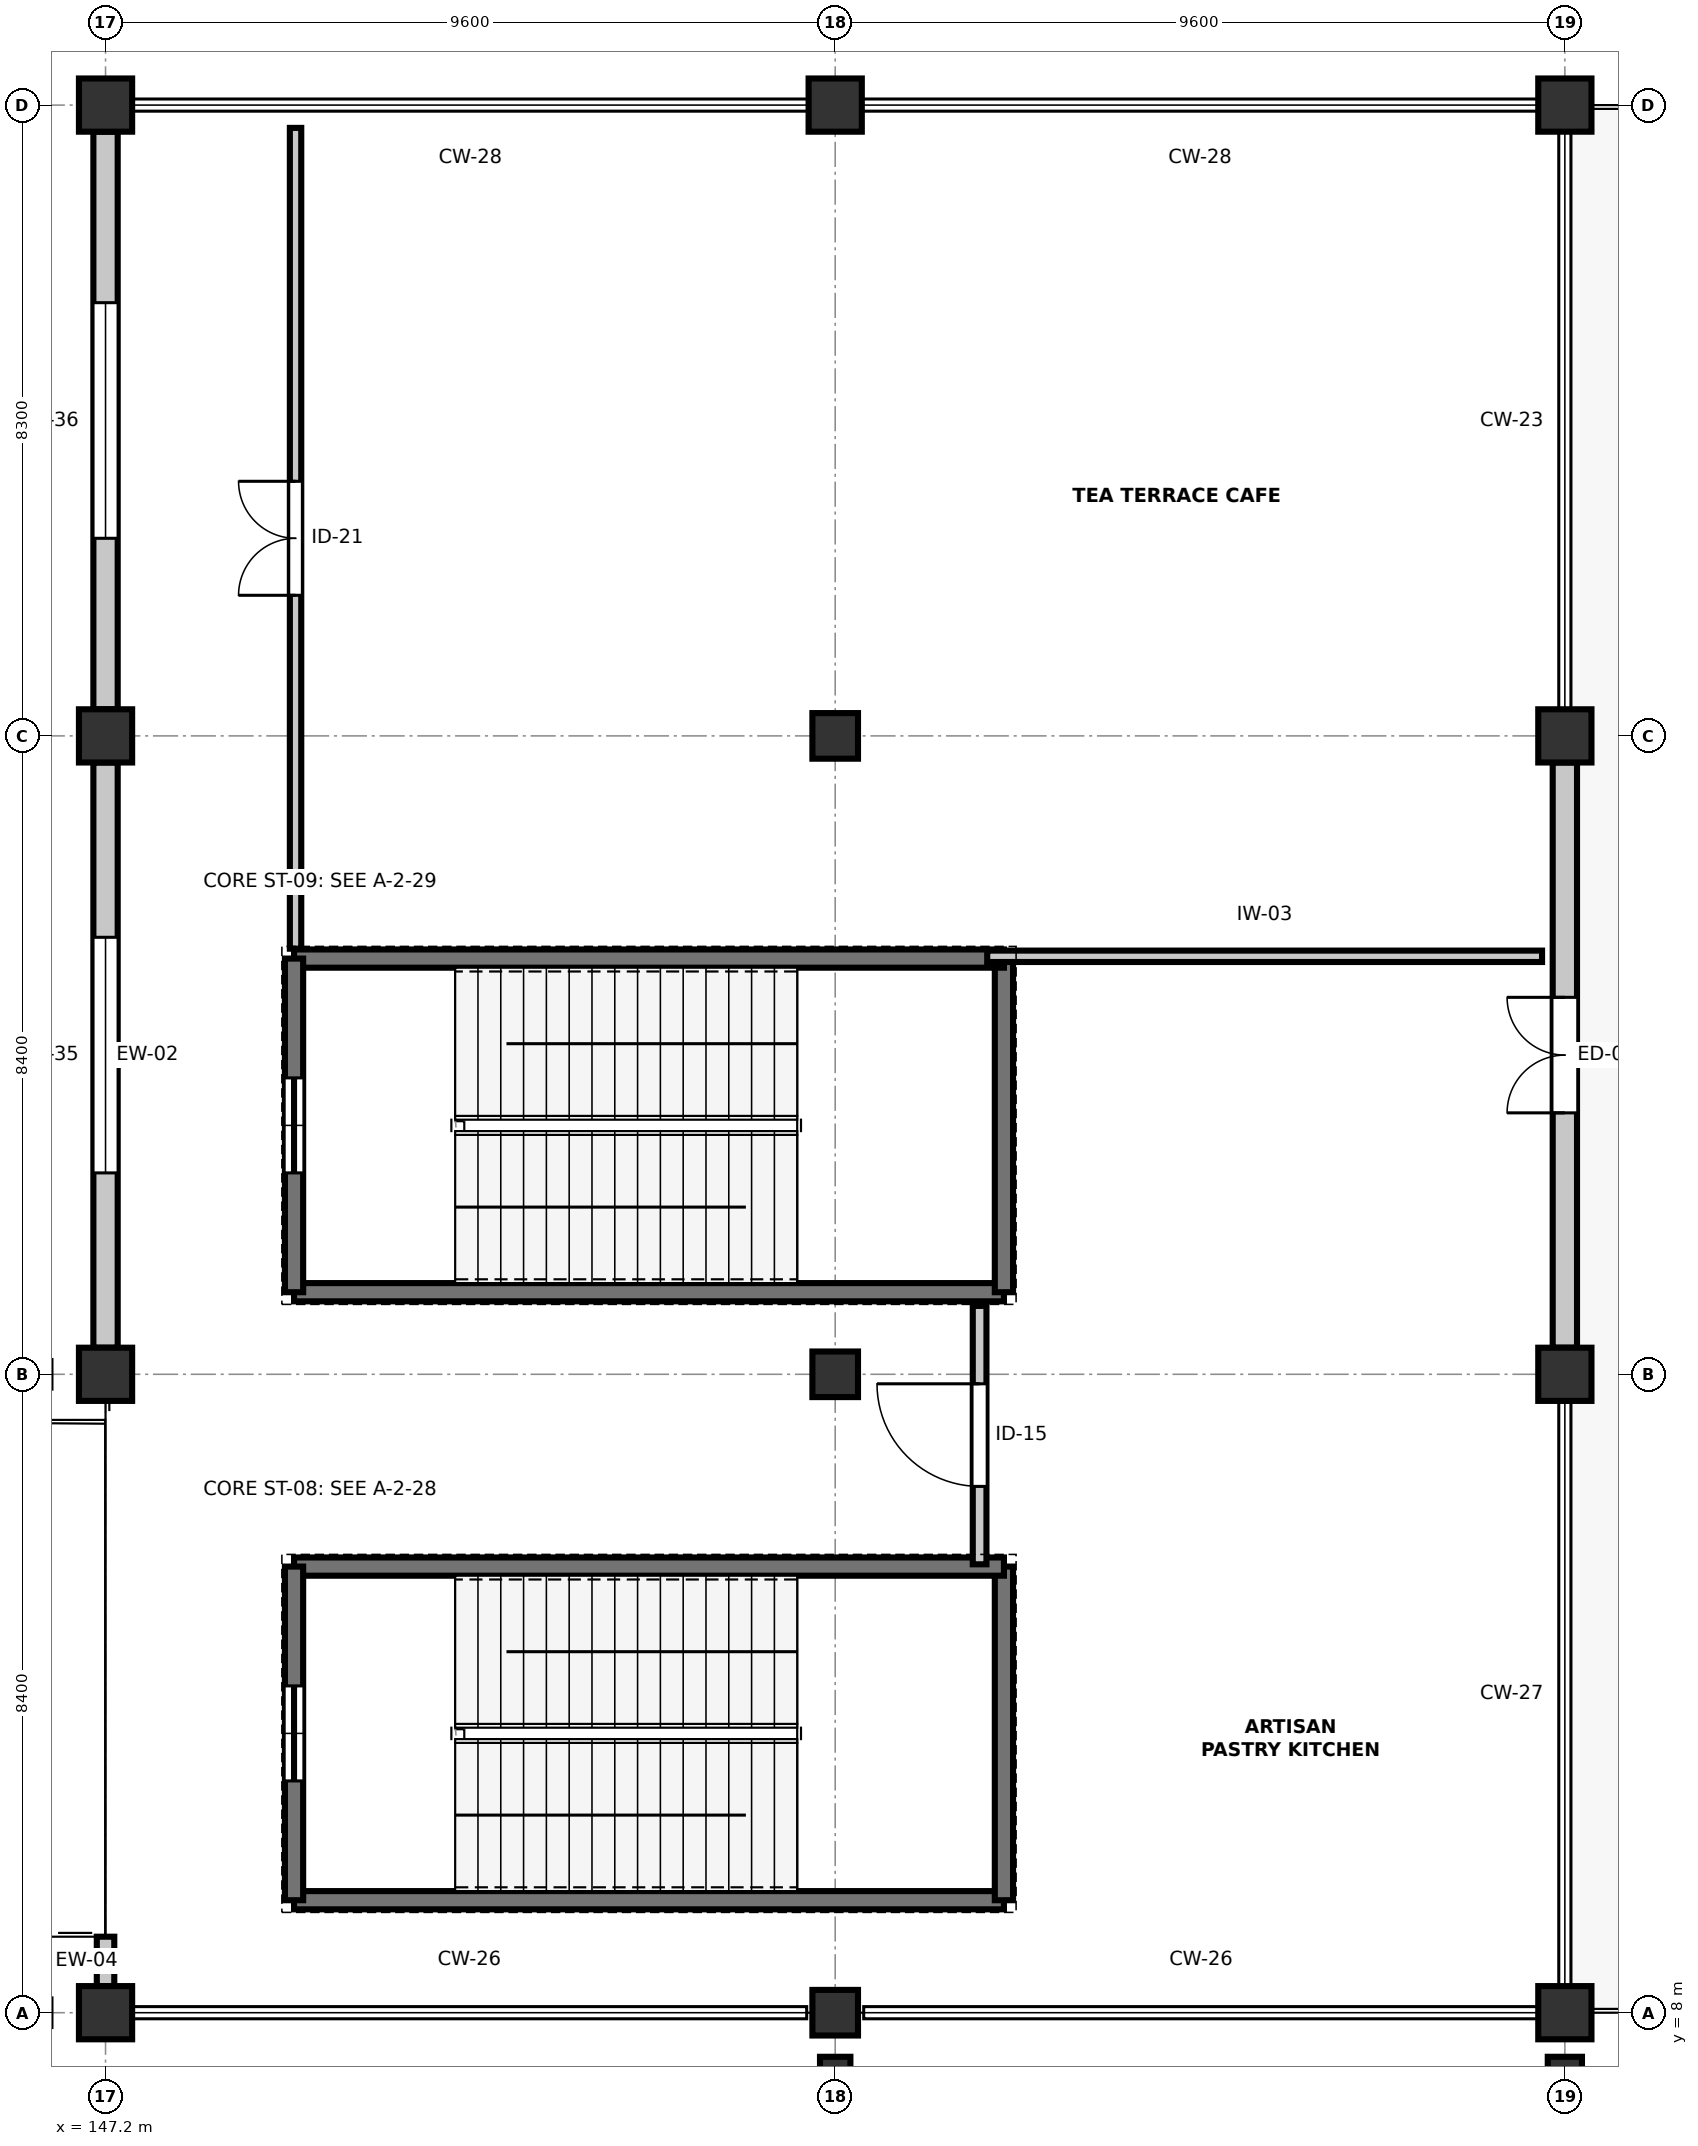
"""IFC4 building model, lengths in metres.
Left out: names, types, materials, properties, quantities, classifications, styles, units other than length and angle.
Written with IfcOpenShell. Run it as: python <this file> out.ifc"""

import sys

from ifc_helpers import new_model, si_unit, direction, frame, frame_2d, origin, origin_2d, place, context, subcontext, project, spatial, rectangle, circle, extrude, element, fill, save


model = new_model("IFC4")
c1 = context("Model", 3, precision=1e-05, world=origin(), true_north=direction((0.0, 1.0)))
c2 = subcontext(c1, "Body", "Model", "MODEL_VIEW")
j1 = project(units=[si_unit("LENGTHUNIT", "METRE"), si_unit("PLANEANGLEUNIT", "RADIAN")], contexts=[c1])
p1 = place(None, origin())
s1 = spatial("IfcSite", under=j1, at=p1, CompositionType="ELEMENT")
p2 = place(p1, origin())
s2 = spatial("IfcBuilding", under=s1, at=p2, CompositionType="ELEMENT")
p3 = place(p2, frame((0.0, 0.0, 9.6)))
s3 = spatial("IfcBuildingStorey", under=s2, at=p3, CompositionType="ELEMENT", Elevation=9.6)
for number, where, z_axis, x_axis in (
    (1, (147.2, 8.0, 0.0), (0.0, 0.0, 1.0), (1.0, 0.0, 0.0)),
    (2, (147.2, 16.4, 0.0), (0.0, 0.0, 1.0), (1.0, 0.0, 0.0)),
    (3, (147.2, 24.8, 0.0), (0.0, 0.0, 1.0), (1.0, 0.0, 0.0)),
    (4, (147.2, 33.1, 0.0), (0.0, 0.0, 1.0), (1.0, 0.0, 0.0)),
):
    element("IfcColumn", number, at=place(p3, frame(where, z_axis=z_axis, x_axis=x_axis)), inside=s3, PredefinedType="COLUMN", context=c2, shape_type="SweptSolid", body=[
        extrude(rectangle(XDim=0.7, YDim=0.7, at=origin_2d()), origin(), (0.0, 0.0, 1.0), 4.8),
    ])
p4 = place(p3, frame((156.8, 8.0, 0.0), z_axis=(0.0, 0.0, 1.0), x_axis=(1.0, 0.0, 0.0)))
e5 = element("IfcColumn", 5, at=p4, inside=s3, PredefinedType="COLUMN", context=c2, shape_type="SweptSolid", body=[
    extrude(circle(Radius=0.375, at=origin_2d()), origin(), (0.0, 0.0, 1.0), 4.8),
])
p5 = place(p3, frame((156.8, 7.095, 0.0), z_axis=(0.0, 0.0, 1.0), x_axis=(1.0, 0.0, 0.0)))
e6 = element("IfcColumn", 6, at=p5, inside=s3, PredefinedType="PILASTER", context=c2, shape_type="SweptSolid", body=[
    extrude(rectangle(XDim=0.4, YDim=0.65, at=origin_2d()), origin(), (0.0, 0.0, 1.0), 4.8),
])
for number, where, z_axis, x_axis in (
    (7, (156.8, 16.4, 0.0), (0.0, 0.0, 1.0), (1.0, 0.0, 0.0)),
    (8, (156.8, 24.8, 0.0), (0.0, 0.0, 1.0), (1.0, 0.0, 0.0)),
):
    element("IfcColumn", number, at=place(p3, frame(where, z_axis=z_axis, x_axis=x_axis)), inside=s3, PredefinedType="COLUMN", context=c2, shape_type="SweptSolid", body=[
        extrude(circle(Radius=0.375, at=origin_2d()), origin(), (0.0, 0.0, 1.0), 4.8),
    ])
for number, where, z_axis, x_axis in (
    (9, (156.8, 33.1, 0.0), (0.0, 0.0, 1.0), (1.0, 0.0, 0.0)),
    (10, (166.4, 8.0, 0.0), (0.0, 0.0, 1.0), (1.0, 0.0, 0.0)),
):
    element("IfcColumn", number, at=place(p3, frame(where, z_axis=z_axis, x_axis=x_axis)), inside=s3, PredefinedType="COLUMN", context=c2, shape_type="SweptSolid", body=[
        extrude(rectangle(XDim=0.7, YDim=0.7, at=origin_2d()), origin(), (0.0, 0.0, 1.0), 4.8),
    ])
p6 = place(p3, frame((166.4, 7.045, 0.0), z_axis=(0.0, 0.0, 1.0), x_axis=(1.0, 0.0, 0.0)))
e11 = element("IfcColumn", 11, at=p6, inside=s3, PredefinedType="PILASTER", context=c2, shape_type="SweptSolid", body=[
    extrude(rectangle(XDim=0.45, YDim=0.75, at=origin_2d()), origin(), (0.0, 0.0, 1.0), 4.8),
])
for number, where, z_axis, x_axis in (
    (12, (166.4, 16.4, 0.0), (0.0, 0.0, 1.0), (1.0, 0.0, 0.0)),
    (13, (166.4, 24.8, 0.0), (0.0, 0.0, 1.0), (1.0, 0.0, 0.0)),
    (14, (166.4, 33.1, 0.0), (0.0, 0.0, 1.0), (1.0, 0.0, 0.0)),
):
    element("IfcColumn", number, at=place(p3, frame(where, z_axis=z_axis, x_axis=x_axis)), inside=s3, PredefinedType="COLUMN", context=c2, shape_type="SweptSolid", body=[
        extrude(rectangle(XDim=0.7, YDim=0.7, at=origin_2d()), origin(), (0.0, 0.0, 1.0), 4.8),
    ])
p7 = place(p3, frame((166.4, 16.75, 0.0), z_axis=(0.0, 0.0, 1.0), x_axis=(0.0, 1.0, 0.0)))
e15 = element("IfcWall", 15, at=p7, inside=s3, PredefinedType="STANDARD", context=c2, shape_type="SweptSolid", body=[
    extrude(rectangle(XDim=7.7, YDim=0.32, at=frame_2d((3.85, 0.0))), origin(), (0.0, 0.0, 1.0), 4.105),
])
p8 = place(p7, frame((3.09, 0.0, 0.0)))
e16 = element("IfcOpeningElement", 16, at=p8, cuts=e15, PredefinedType="OPENING", context=c2, shape_type="SweptSolid", body=[
    extrude(rectangle(XDim=1.52, YDim=2.22, at=frame_2d((0.76, 1.11))), frame((0.0, 0.17, 0.0), z_axis=(0.0, -1.0, 0.0), x_axis=(1.0, 0.0, 0.0)), (0.0, 0.0, 1.0), 0.34),
])
p9 = place(p3, frame((147.2, 8.35, 0.0), z_axis=(0.0, 0.0, 1.0), x_axis=(0.0, 1.0, 0.0)))
e17 = element("IfcWall", 17, at=p9, inside=s3, PredefinedType="STANDARD", context=c2, shape_type="SweptSolid", body=[
    extrude(rectangle(XDim=0.65, YDim=0.23, at=frame_2d((0.325, 0.0))), origin(), (0.0, 0.0, 1.0), 4.115),
])
p10 = place(p3, frame((147.2, 24.45, 0.0), z_axis=(0.0, 0.0, 1.0), x_axis=(0.0, -1.0, 0.0)))
e18 = element("IfcWall", 18, at=p10, inside=s3, PredefinedType="STANDARD", context=c2, shape_type="SweptSolid", body=[
    extrude(rectangle(XDim=7.7, YDim=0.32, at=frame_2d((3.85, 0.0))), origin(), (0.0, 0.0, 1.0), 4.115),
])
p11 = place(p10, frame((2.3, 0.0, 0.95)))
e19 = element("IfcOpeningElement", 19, at=p11, cuts=e18, PredefinedType="OPENING", context=c2, shape_type="SweptSolid", body=[
    extrude(rectangle(XDim=3.1, YDim=1.95, at=frame_2d((1.55, 0.975))), frame((0.0, 0.17, 0.0), z_axis=(0.0, -1.0, 0.0), x_axis=(1.0, 0.0, 0.0)), (0.0, 0.0, 1.0), 0.34),
])
p12 = place(p3, frame((147.2, 32.75, 0.0), z_axis=(0.0, 0.0, 1.0), x_axis=(0.0, -1.0, 0.0)))
e20 = element("IfcWall", 20, at=p12, inside=s3, PredefinedType="STANDARD", context=c2, shape_type="SweptSolid", body=[
    extrude(rectangle(XDim=7.6, YDim=0.32, at=frame_2d((3.8, 0.0))), origin(), (0.0, 0.0, 1.0), 4.105),
])
p13 = place(p12, frame((2.25, 0.0, 0.95)))
e21 = element("IfcOpeningElement", 21, at=p13, cuts=e20, PredefinedType="OPENING", context=c2, shape_type="SweptSolid", body=[
    extrude(rectangle(XDim=3.1, YDim=2.15, at=frame_2d((1.55, 1.075))), frame((0.0, 0.17, 0.0), z_axis=(0.0, -1.0, 0.0), x_axis=(1.0, 0.0, 0.0)), (0.0, 0.0, 1.0), 0.34),
])
p14 = place(p3, frame((149.68, 9.48, 0.0), z_axis=(0.0, 0.0, 1.0), x_axis=(1.0, 0.0, 0.0)))
e22 = element("IfcWall", 22, at=p14, inside=s3, PredefinedType="SHEAR", context=c2, shape_type="SweptSolid", body=[
    extrude(rectangle(XDim=9.34, YDim=0.24, at=frame_2d((4.67, 0.0))), origin(), (0.0, 0.0, 1.0), 4.52),
])
p15 = place(p3, frame((159.02, 9.48, 0.0), z_axis=(0.0, 0.0, 1.0), x_axis=(0.0, 1.0, 0.0)))
e23 = element("IfcWall", 23, at=p15, inside=s3, PredefinedType="SHEAR", context=c2, shape_type="SweptSolid", body=[
    extrude(rectangle(XDim=4.39, YDim=0.24, at=frame_2d((2.195, 0.0))), origin(), (0.0, 0.0, 1.0), 4.52),
])
p16 = place(p3, frame((159.02, 13.87, 0.0), z_axis=(0.0, 0.0, 1.0), x_axis=(-1.0, 0.0, 0.0)))
e24 = element("IfcWall", 24, at=p16, inside=s3, PredefinedType="SHEAR", context=c2, shape_type="SweptSolid", body=[
    extrude(rectangle(XDim=9.34, YDim=0.24, at=frame_2d((4.67, 0.0))), origin(), (0.0, 0.0, 1.0), 4.52),
])
p17 = place(p3, frame((149.68, 13.87, 0.0), z_axis=(0.0, 0.0, 1.0), x_axis=(0.0, -1.0, 0.0)))
e25 = element("IfcWall", 25, at=p17, inside=s3, PredefinedType="SHEAR", context=c2, shape_type="SweptSolid", body=[
    extrude(rectangle(XDim=4.39, YDim=0.24, at=frame_2d((2.195, 0.0))), origin(), (0.0, 0.0, 1.0), 4.52),
])
p18 = place(p17, frame((1.57, 0.0, 0.0)))
e26 = element("IfcOpeningElement", 26, at=p18, cuts=e25, PredefinedType="OPENING", context=c2, shape_type="SweptSolid", body=[
    extrude(rectangle(XDim=1.25, YDim=2.2, at=frame_2d((0.625, 1.1))), frame((0.0, 0.13, 0.0), z_axis=(0.0, -1.0, 0.0), x_axis=(1.0, 0.0, 0.0)), (0.0, 0.0, 1.0), 0.26),
])
p19 = place(p3, frame((149.68, 17.48, 0.0), z_axis=(0.0, 0.0, 1.0), x_axis=(1.0, 0.0, 0.0)))
e27 = element("IfcWall", 27, at=p19, inside=s3, PredefinedType="SHEAR", context=c2, shape_type="SweptSolid", body=[
    extrude(rectangle(XDim=9.34, YDim=0.24, at=frame_2d((4.67, 0.0))), origin(), (0.0, 0.0, 1.0), 4.52),
])
p20 = place(p3, frame((159.02, 17.48, 0.0), z_axis=(0.0, 0.0, 1.0), x_axis=(0.0, 1.0, 0.0)))
e28 = element("IfcWall", 28, at=p20, inside=s3, PredefinedType="SHEAR", context=c2, shape_type="SweptSolid", body=[
    extrude(rectangle(XDim=4.39, YDim=0.24, at=frame_2d((2.195, 0.0))), origin(), (0.0, 0.0, 1.0), 4.52),
])
p21 = place(p3, frame((159.02, 21.87, 0.0), z_axis=(0.0, 0.0, 1.0), x_axis=(-1.0, 0.0, 0.0)))
e29 = element("IfcWall", 29, at=p21, inside=s3, PredefinedType="SHEAR", context=c2, shape_type="SweptSolid", body=[
    extrude(rectangle(XDim=9.34, YDim=0.24, at=frame_2d((4.67, 0.0))), origin(), (0.0, 0.0, 1.0), 4.52),
])
p22 = place(p3, frame((149.68, 21.87, 0.0), z_axis=(0.0, 0.0, 1.0), x_axis=(0.0, -1.0, 0.0)))
e30 = element("IfcWall", 30, at=p22, inside=s3, PredefinedType="SHEAR", context=c2, shape_type="SweptSolid", body=[
    extrude(rectangle(XDim=4.39, YDim=0.24, at=frame_2d((2.195, 0.0))), origin(), (0.0, 0.0, 1.0), 4.52),
])
p23 = place(p22, frame((1.57, 0.0, 0.0)))
e31 = element("IfcOpeningElement", 31, at=p23, cuts=e30, PredefinedType="OPENING", context=c2, shape_type="SweptSolid", body=[
    extrude(rectangle(XDim=1.25, YDim=2.2, at=frame_2d((0.625, 1.1))), frame((0.0, 0.13, 0.0), z_axis=(0.0, -1.0, 0.0), x_axis=(1.0, 0.0, 0.0)), (0.0, 0.0, 1.0), 0.26),
])
p24 = place(p3, frame((149.7, 22.0, 0.0), z_axis=(0.0, 0.0, 1.0), x_axis=(0.0, 1.0, 0.0)))
e32 = element("IfcWall", 32, at=p24, inside=s3, PredefinedType="PARTITIONING", context=c2, shape_type="SweptSolid", body=[
    extrude(rectangle(XDim=10.8, YDim=0.15, at=frame_2d((5.4, 0.0))), origin(), (0.0, 0.0, 1.0), 4.017),
])
p25 = place(p24, frame((4.65, 0.0, 0.0)))
e33 = element("IfcOpeningElement", 33, at=p25, cuts=e32, PredefinedType="OPENING", context=c2, shape_type="SweptSolid", body=[
    extrude(rectangle(XDim=1.5, YDim=2.24, at=frame_2d((0.75, 1.12))), frame((0.0, 0.085, 0.0), z_axis=(0.0, -1.0, 0.0), x_axis=(1.0, 0.0, 0.0)), (0.0, 0.0, 1.0), 0.17),
])
p26 = place(p3, frame((158.7, 13.9, 0.0), z_axis=(0.0, 0.0, 1.0), x_axis=(0.0, 1.0, 0.0)))
e34 = element("IfcWall", 34, at=p26, inside=s3, PredefinedType="PARTITIONING", context=c2, shape_type="SweptSolid", body=[
    extrude(rectangle(XDim=3.4, YDim=0.18, at=frame_2d((1.7, 0.0))), origin(), (0.0, 0.0, 1.0), 4.017),
])
p27 = place(p26, frame((1.025, 0.0, 0.0)))
e35 = element("IfcOpeningElement", 35, at=p27, cuts=e34, PredefinedType="OPENING", context=c2, shape_type="SweptSolid", body=[
    extrude(rectangle(XDim=1.35, YDim=2.2, at=frame_2d((0.675, 1.1))), frame((0.0, 0.1, 0.0), z_axis=(0.0, -1.0, 0.0), x_axis=(1.0, 0.0, 0.0)), (0.0, 0.0, 1.0), 0.2),
])
p28 = place(p3, frame((158.8, 21.9, 0.0), z_axis=(0.0, 0.0, 1.0), x_axis=(1.0, 0.0, 0.0)))
e36 = element("IfcWall", 36, at=p28, inside=s3, PredefinedType="PARTITIONING", context=c2, shape_type="SweptSolid", body=[
    extrude(rectangle(XDim=7.3, YDim=0.15, at=frame_2d((3.65, 0.0))), origin(), (0.0, 0.0, 1.0), 4.505),
])
p29 = place(p8, origin())
e37 = element("IfcDoor", 37, at=p29, inside=s3, OperationType="DOUBLE_DOOR_SINGLE_SWING", PredefinedType="DOOR", context=c2, shape_type="SweptSolid", body=[
    extrude(rectangle(XDim=1.52, YDim=2.22, at=frame_2d((0.76, 1.11))), frame((0.0, 0.025, 0.0), z_axis=(0.0, -1.0, 0.0), x_axis=(1.0, 0.0, 0.0)), (0.0, 0.0, 1.0), 0.05),
])
fill(e16, e37)
p30 = place(p11, origin())
e38 = element("IfcWindow", 38, at=p30, inside=s3, PartitioningType="SINGLE_PANEL", PredefinedType="WINDOW", context=c2, shape_type="SweptSolid", body=[
    extrude(rectangle(XDim=3.1, YDim=1.95, at=frame_2d((1.55, 0.975))), frame((0.0, 0.03, 0.0), z_axis=(0.0, -1.0, 0.0), x_axis=(1.0, 0.0, 0.0)), (0.0, 0.0, 1.0), 0.06),
])
fill(e19, e38)
p31 = place(p13, origin())
e39 = element("IfcWindow", 39, at=p31, inside=s3, PartitioningType="SINGLE_PANEL", PredefinedType="WINDOW", context=c2, shape_type="SweptSolid", body=[
    extrude(rectangle(XDim=3.1, YDim=2.15, at=frame_2d((1.55, 1.075))), frame((0.0, 0.03, 0.0), z_axis=(0.0, -1.0, 0.0), x_axis=(1.0, 0.0, 0.0)), (0.0, 0.0, 1.0), 0.06),
])
fill(e21, e39)
p32 = place(p18, origin())
e40 = element("IfcDoor", 40, at=p32, inside=s3, OperationType="SINGLE_SWING_LEFT", PredefinedType="DOOR", context=c2, shape_type="SweptSolid", body=[
    extrude(rectangle(XDim=1.25, YDim=2.2, at=frame_2d((0.625, 1.1))), frame((0.0, 0.025, 0.0), z_axis=(0.0, -1.0, 0.0), x_axis=(1.0, 0.0, 0.0)), (0.0, 0.0, 1.0), 0.05),
])
fill(e26, e40)
p33 = place(p23, origin())
e41 = element("IfcDoor", 41, at=p33, inside=s3, OperationType="SINGLE_SWING_RIGHT", PredefinedType="DOOR", context=c2, shape_type="SweptSolid", body=[
    extrude(rectangle(XDim=1.25, YDim=2.2, at=frame_2d((0.625, 1.1))), frame((0.0, 0.025, 0.0), z_axis=(0.0, -1.0, 0.0), x_axis=(1.0, 0.0, 0.0)), (0.0, 0.0, 1.0), 0.05),
])
fill(e31, e41)
p34 = place(p25, origin())
e42 = element("IfcDoor", 42, at=p34, inside=s3, OperationType="DOUBLE_DOOR_SINGLE_SWING", PredefinedType="DOOR", context=c2, shape_type="SweptSolid", body=[
    extrude(rectangle(XDim=1.5, YDim=2.24, at=frame_2d((0.75, 1.12))), frame((0.0, 0.025, 0.0), z_axis=(0.0, -1.0, 0.0), x_axis=(1.0, 0.0, 0.0)), (0.0, 0.0, 1.0), 0.05),
])
fill(e33, e42)
p35 = place(p27, origin())
e43 = element("IfcDoor", 43, at=p35, inside=s3, OperationType="SINGLE_SWING_RIGHT", PredefinedType="DOOR", context=c2, shape_type="SweptSolid", body=[
    extrude(rectangle(XDim=1.35, YDim=2.2, at=frame_2d((0.675, 1.1))), frame((0.0, 0.025, 0.0), z_axis=(0.0, -1.0, 0.0), x_axis=(1.0, 0.0, 0.0)), (0.0, 0.0, 1.0), 0.05),
])
fill(e35, e43)
save(model, sys.argv[1])
